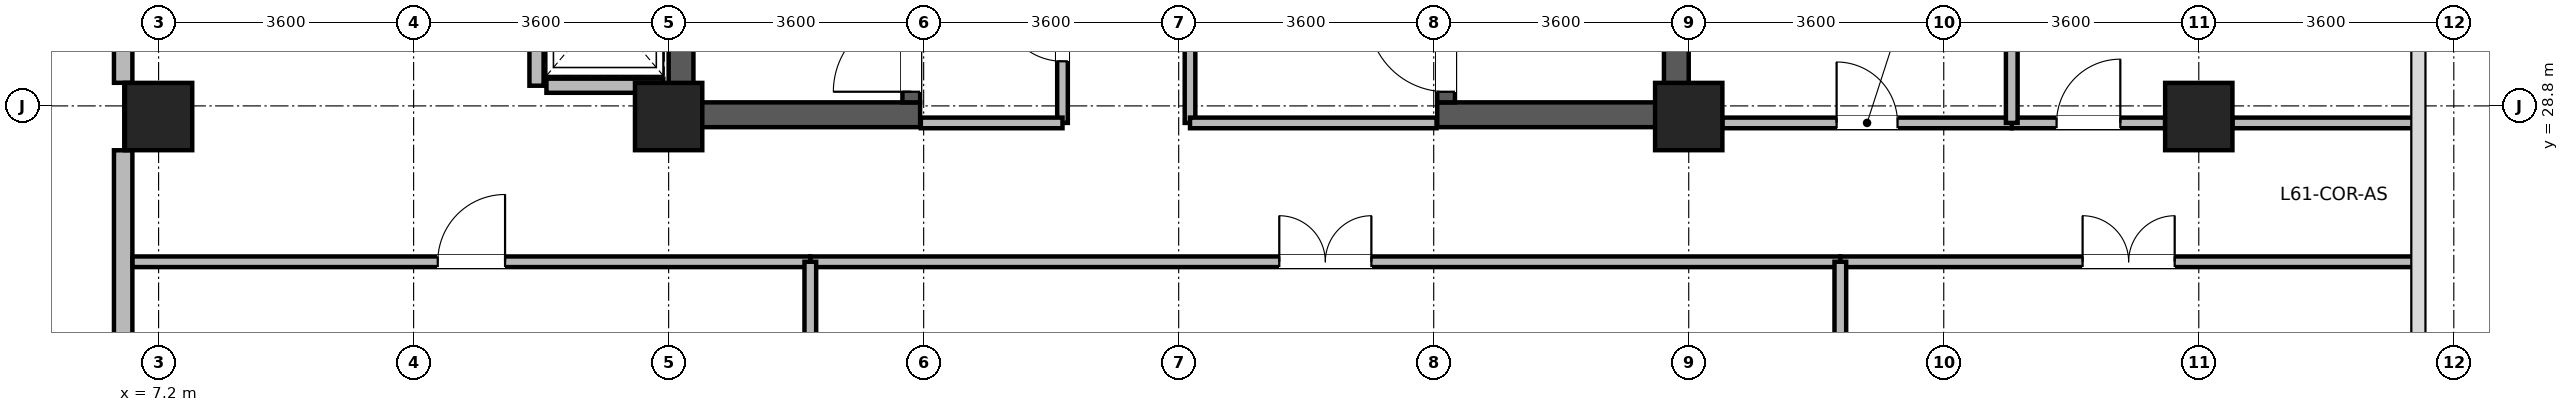
"""IFC4 building model, lengths in metres.
Left out: names, types, materials, properties, quantities, classifications, styles, units other than length and angle.
Written with IfcOpenShell. Run it as: python <this file> out.ifc"""

import sys

from ifc_helpers import new_model, si_unit, direction, frame, frame_2d, origin, origin_2d, place, context, subcontext, project, spatial, rectangle, extrude, source, transform, mapped, element, fill, save


model = new_model("IFC4")
c1 = context("Model", 3, precision=1e-05, world=origin(), true_north=direction((0.0, 1.0)))
c2 = subcontext(c1, "Body", "Model", "MODEL_VIEW")
j1 = project(units=[si_unit("LENGTHUNIT", "METRE"), si_unit("PLANEANGLEUNIT", "RADIAN")], contexts=[c1])
p1 = place(None, origin())
s1 = spatial("IfcSite", under=j1, at=p1, CompositionType="ELEMENT")
p2 = place(p1, origin())
s2 = spatial("IfcBuilding", under=s1, at=p2, CompositionType="ELEMENT")
p3 = place(p2, frame((0.0, 0.0, 238.8)))
s3 = spatial("IfcBuildingStorey", under=s2, at=p3, CompositionType="ELEMENT", Elevation=238.8)
for number, where, z_axis, x_axis in (
    (1, (14.575, 28.5, 0.0), (0.0, 0.0, 1.0), (0.0, 1.0, 0.0)),
    (2, (28.625, 28.5, 0.0), (0.0, 0.0, 1.0), (0.0, 1.0, 0.0)),
):
    element("IfcWall", number, at=place(p3, frame(where, z_axis=z_axis, x_axis=x_axis)), inside=s3, PredefinedType="SHEAR", context=c2, shape_type="SweptSolid", body=[
        extrude(rectangle(XDim=7.7, YDim=0.35, at=frame_2d((3.85, 0.0))), origin(), (0.0, 0.0, 1.0), 3.44),
    ])
for number, where, z_axis, x_axis in (
    (3, (14.75, 28.675, 0.0), (0.0, 0.0, 1.0), (1.0, 0.0, 0.0)),
    (4, (25.25, 28.675, 0.0), (0.0, 0.0, 1.0), (1.0, 0.0, 0.0)),
):
    element("IfcWall", number, at=place(p3, frame(where, z_axis=z_axis, x_axis=x_axis)), inside=s3, PredefinedType="SHEAR", context=c2, shape_type="SweptSolid", body=[
        extrude(rectangle(XDim=3.2, YDim=0.35, at=frame_2d((1.6, 0.0))), origin(), (0.0, 0.0, 1.0), 3.44),
    ])
p4 = place(p3, frame((17.825, 28.85, 0.0), z_axis=(0.0, 0.0, 1.0), x_axis=(0.0, 1.0, 0.0)))
e5 = element("IfcWall", 5, at=p4, inside=s3, PredefinedType="SHEAR", context=c2, shape_type="SweptSolid", body=[
    extrude(rectangle(XDim=7.0, YDim=0.25, at=frame_2d((3.5, 0.0))), origin(), (0.0, 0.0, 1.0), 3.44),
])
p5 = place(p4, frame((0.15, 0.0, 0.0)))
e6 = element("IfcOpeningElement", 6, at=p5, cuts=e5, PredefinedType="OPENING", context=c2, shape_type="SweptSolid", body=[
    extrude(rectangle(XDim=1.1, YDim=2.08, at=frame_2d((0.55, 1.04))), frame((0.0, 0.135, 0.0), z_axis=(0.0, -1.0, 0.0), x_axis=(1.0, 0.0, 0.0)), (0.0, 0.0, 1.0), 0.27),
])
p6 = place(p3, frame((25.375, 28.85, 0.0), z_axis=(0.0, 0.0, 1.0), x_axis=(0.0, 1.0, 0.0)))
e7 = element("IfcWall", 7, at=p6, inside=s3, PredefinedType="SHEAR", context=c2, shape_type="SweptSolid", body=[
    extrude(rectangle(XDim=7.0, YDim=0.25, at=frame_2d((3.5, 0.0))), origin(), (0.0, 0.0, 1.0), 3.44),
])
p7 = place(p6, frame((0.15, 0.0, 0.0)))
e8 = element("IfcOpeningElement", 8, at=p7, cuts=e7, PredefinedType="OPENING", context=c2, shape_type="SweptSolid", body=[
    extrude(rectangle(XDim=1.1, YDim=2.08, at=frame_2d((0.55, 1.04))), frame((0.0, 0.135, 0.0), z_axis=(0.0, -1.0, 0.0), x_axis=(1.0, 0.0, 0.0)), (0.0, 0.0, 1.0), 0.27),
])
m1 = source(origin(), c2, "Body", "SweptSolid", [
    extrude(rectangle(XDim=0.95, YDim=0.95, at=origin_2d()), origin(), (0.0, 0.0, 1.0), 3.7),
])
for number, where, z_axis, x_axis in (
    (9, (7.2, 28.65, 0.0), (0.0, 0.0, 1.0), (1.0, 0.0, 0.0)),
    (10, (14.4, 28.65, 0.0), (0.0, 0.0, 1.0), (1.0, 0.0, 0.0)),
    (11, (28.8, 28.65, 0.0), (0.0, 0.0, 1.0), (1.0, 0.0, 0.0)),
    (12, (36.0, 28.65, 0.0), (0.0, 0.0, 1.0), (1.0, 0.0, 0.0)),
):
    element("IfcColumn", number, at=place(p3, frame(where, z_axis=z_axis, x_axis=x_axis)), inside=s3, PredefinedType="COLUMN", context=c2, shape_type="MappedRepresentation", body=[
        mapped(m1, transform((0.0, 0.0, 0.0), x_axis=(1.0, 0.0, 0.0), y_axis=(0.0, 1.0, 0.0), z_axis=(0.0, 0.0, 1.0), scale=1.0)),
    ])
p8 = place(p3, frame((6.7, 29.126, 0.0), z_axis=(0.0, 0.0, 1.0), x_axis=(0.0, 1.0, 0.0)))
e13 = element("IfcWall", 13, at=p8, inside=s3, PredefinedType="STANDARD", context=c2, shape_type="SweptSolid", body=[
    extrude(rectangle(XDim=6.548, YDim=0.26, at=frame_2d((3.274, 0.0))), origin(), (0.0, 0.0, 1.0), 3.42),
])
p9 = place(p8, frame((1.037, 0.0, 0.85)))
e14 = element("IfcOpeningElement", 14, at=p9, cuts=e13, PredefinedType="OPENING", context=c2, shape_type="SweptSolid", body=[
    extrude(rectangle(XDim=1.2, YDim=1.75, at=frame_2d((0.6, 0.875))), frame((0.0, 0.14, 0.0), z_axis=(0.0, -1.0, 0.0), x_axis=(1.0, 0.0, 0.0)), (0.0, 0.0, 1.0), 0.28),
])
p10 = place(p8, frame((4.311, 0.0, 0.85)))
e15 = element("IfcOpeningElement", 15, at=p10, cuts=e13, PredefinedType="OPENING", context=c2, shape_type="SweptSolid", body=[
    extrude(rectangle(XDim=1.2, YDim=1.75, at=frame_2d((0.6, 0.875))), frame((0.0, 0.14, 0.0), z_axis=(0.0, -1.0, 0.0), x_axis=(1.0, 0.0, 0.0)), (0.0, 0.0, 1.0), 0.28),
])
p11 = place(p3, frame((6.7, 21.47, 0.0), z_axis=(0.0, 0.0, 1.0), x_axis=(0.0, 1.0, 0.0)))
e16 = element("IfcWall", 16, at=p11, inside=s3, PredefinedType="STANDARD", context=c2, shape_type="SweptSolid", body=[
    extrude(rectangle(XDim=6.704, YDim=0.26, at=frame_2d((3.352, 0.0))), origin(), (0.0, 0.0, 1.0), 3.42),
])
p12 = place(p11, frame((2.877, 0.0, 0.85)))
e17 = element("IfcOpeningElement", 17, at=p12, cuts=e16, PredefinedType="OPENING", context=c2, shape_type="SweptSolid", body=[
    extrude(rectangle(XDim=0.95, YDim=1.75, at=frame_2d((0.475, 0.875))), frame((0.0, 0.14, 0.0), z_axis=(0.0, -1.0, 0.0), x_axis=(1.0, 0.0, 0.0)), (0.0, 0.0, 1.0), 0.28),
])
p13 = place(p3, frame((12.675, 29.085, 0.0), z_axis=(0.0, 0.0, 1.0), x_axis=(1.0, 0.0, 0.0)))
e18 = element("IfcWall", 18, at=p13, inside=s3, PredefinedType="PARTITIONING", context=c2, shape_type="SweptSolid", body=[
    extrude(rectangle(XDim=1.65, YDim=0.2, at=frame_2d((0.825, 0.0))), origin(), (0.0, 0.0, 1.0), 3.42),
])
p14 = place(p3, frame((12.535, 29.085, 0.0), z_axis=(0.0, 0.0, 1.0), x_axis=(0.0, 1.0, 0.0)))
e19 = element("IfcWall", 19, at=p14, inside=s3, PredefinedType="PARTITIONING", context=c2, shape_type="SweptSolid", body=[
    extrude(rectangle(XDim=2.23, YDim=0.2, at=frame_2d((1.115, 0.0))), origin(), (0.0, 0.0, 1.0), 3.42),
])
p15 = place(p3, frame((16.4, 26.6, 0.0), z_axis=(0.0, 0.0, 1.0), x_axis=(1.0, 0.0, 0.0)))
e20 = element("IfcWall", 20, at=p15, inside=s3, PredefinedType="PARTITIONING", context=c2, shape_type="SweptSolid", body=[
    extrude(rectangle(XDim=14.54, YDim=0.15, at=frame_2d((7.27, 0.0))), origin(), (0.0, 0.0, 1.0), 3.42),
])
p16 = place(p15, frame((6.62, 0.0, 0.0)))
e21 = element("IfcOpeningElement", 21, at=p16, cuts=e20, PredefinedType="OPENING", context=c2, shape_type="SweptSolid", body=[
    extrude(rectangle(XDim=1.3, YDim=2.12, at=frame_2d((0.65, 1.06))), frame((0.0, 0.085, 0.0), z_axis=(0.0, -1.0, 0.0), x_axis=(1.0, 0.0, 0.0)), (0.0, 0.0, 1.0), 0.17),
])
p17 = place(p3, frame((6.832, 26.6, 0.0), z_axis=(0.0, 0.0, 1.0), x_axis=(1.0, 0.0, 0.0)))
e22 = element("IfcWall", 22, at=p17, inside=s3, PredefinedType="PARTITIONING", context=c2, shape_type="SweptSolid", body=[
    extrude(rectangle(XDim=9.568, YDim=0.15, at=frame_2d((4.784, 0.0))), origin(), (0.0, 0.0, 1.0), 3.42),
])
p18 = place(p17, frame((4.309, 0.0, 0.0)))
e23 = element("IfcOpeningElement", 23, at=p18, cuts=e22, PredefinedType="OPENING", context=c2, shape_type="SweptSolid", body=[
    extrude(rectangle(XDim=0.95, YDim=2.1, at=frame_2d((0.475, 1.05))), frame((0.0, 0.085, 0.0), z_axis=(0.0, -1.0, 0.0), x_axis=(1.0, 0.0, 0.0)), (0.0, 0.0, 1.0), 0.17),
])
p19 = place(p3, frame((30.94, 26.6, 0.0), z_axis=(0.0, 0.0, 1.0), x_axis=(1.0, 0.0, 0.0)))
e24 = element("IfcWall", 24, at=p19, inside=s3, PredefinedType="PARTITIONING", context=c2, shape_type="SweptSolid", body=[
    extrude(rectangle(XDim=8.14, YDim=0.15, at=frame_2d((4.07, 0.0))), origin(), (0.0, 0.0, 1.0), 3.42),
])
p20 = place(p19, frame((3.42, 0.0, 0.0)))
e25 = element("IfcOpeningElement", 25, at=p20, cuts=e24, PredefinedType="OPENING", context=c2, shape_type="SweptSolid", body=[
    extrude(rectangle(XDim=1.3, YDim=2.12, at=frame_2d((0.65, 1.06))), frame((0.0, 0.085, 0.0), z_axis=(0.0, -1.0, 0.0), x_axis=(1.0, 0.0, 0.0)), (0.0, 0.0, 1.0), 0.17),
])
p21 = place(p3, frame((33.36, 28.56, 0.0), z_axis=(0.0, 0.0, 1.0), x_axis=(1.0, 0.0, 0.0)))
e26 = element("IfcWall", 26, at=p21, inside=s3, PredefinedType="PARTITIONING", context=c2, shape_type="SweptSolid", body=[
    extrude(rectangle(XDim=2.165, YDim=0.15, at=frame_2d((1.083, 0.0))), origin(), (0.0, 0.0, 1.0), 2.87),
])
p22 = place(p21, frame((0.633, 0.0, 0.0)))
e27 = element("IfcOpeningElement", 27, at=p22, cuts=e26, PredefinedType="OPENING", context=c2, shape_type="SweptSolid", body=[
    extrude(rectangle(XDim=0.9, YDim=2.08, at=frame_2d((0.45, 1.04))), frame((0.0, 0.085, 0.0), z_axis=(0.0, -1.0, 0.0), x_axis=(1.0, 0.0, 0.0)), (0.0, 0.0, 1.0), 0.17),
])
p23 = place(p3, frame((36.475, 28.56, 0.0), z_axis=(0.0, 0.0, 1.0), x_axis=(1.0, 0.0, 0.0)))
e28 = element("IfcWall", 28, at=p23, inside=s3, PredefinedType="PARTITIONING", context=c2, shape_type="SweptSolid", body=[
    extrude(rectangle(XDim=2.605, YDim=0.15, at=frame_2d((1.302, 0.0))), origin(), (0.0, 0.0, 1.0), 3.42),
])
p24 = place(p3, frame((29.275, 28.56, 0.0), z_axis=(0.0, 0.0, 1.0), x_axis=(1.0, 0.0, 0.0)))
e29 = element("IfcWall", 29, at=p24, inside=s3, PredefinedType="PARTITIONING", context=c2, shape_type="SweptSolid", body=[
    extrude(rectangle(XDim=4.085, YDim=0.15, at=frame_2d((2.042, 0.0))), origin(), (0.0, 0.0, 1.0), 2.87),
])
p25 = place(p24, frame((1.613, 0.0, 0.0)))
e30 = element("IfcOpeningElement", 30, at=p25, cuts=e29, PredefinedType="OPENING", context=c2, shape_type="SweptSolid", body=[
    extrude(rectangle(XDim=0.86, YDim=2.02, at=frame_2d((0.43, 1.01))), frame((0.0, 0.085, 0.0), z_axis=(0.0, -1.0, 0.0), x_axis=(1.0, 0.0, 0.0)), (0.0, 0.0, 1.0), 0.17),
])
p26 = place(p3, frame((19.96, 28.56, 0.0), z_axis=(0.0, 0.0, 1.0), x_axis=(0.0, 1.0, 0.0)))
e31 = element("IfcWall", 31, at=p26, inside=s3, PredefinedType="PARTITIONING", context=c2, shape_type="SweptSolid", body=[
    extrude(rectangle(XDim=2.6, YDim=0.15, at=frame_2d((1.3, 0.0))), origin(), (0.0, 0.0, 1.0), 3.42),
])
p27 = place(p26, frame((0.87, 0.0, 0.0)))
e32 = element("IfcOpeningElement", 32, at=p27, cuts=e31, PredefinedType="OPENING", context=c2, shape_type="SweptSolid", body=[
    extrude(rectangle(XDim=0.86, YDim=2.02, at=frame_2d((0.43, 1.01))), frame((0.0, 0.085, 0.0), z_axis=(0.0, -1.0, 0.0), x_axis=(1.0, 0.0, 0.0)), (0.0, 0.0, 1.0), 0.17),
])
p28 = place(p3, frame((17.96, 28.56, 0.0), z_axis=(0.0, 0.0, 1.0), x_axis=(1.0, 0.0, 0.0)))
e33 = element("IfcWall", 33, at=p28, inside=s3, PredefinedType="PARTITIONING", context=c2, shape_type="SweptSolid", body=[
    extrude(rectangle(XDim=2.0, YDim=0.15, at=frame_2d((1.0, 0.0))), origin(), (0.0, 0.0, 1.0), 2.52),
])
for number, where, z_axis, x_axis in (
    (34, (16.4, 21.732, 0.0), (0.0, 0.0, 1.0), (0.0, 1.0, 0.0)),
    (35, (30.94, 21.732, 0.0), (0.0, 0.0, 1.0), (0.0, 1.0, 0.0)),
):
    element("IfcWall", number, at=place(p3, frame(where, z_axis=z_axis, x_axis=x_axis)), inside=s3, PredefinedType="PARTITIONING", context=c2, shape_type="SweptSolid", body=[
        extrude(rectangle(XDim=4.868, YDim=0.165, at=frame_2d((2.434, 0.0))), origin(), (0.0, 0.0, 1.0), 3.42),
    ])
p29 = place(p3, frame((21.76, 28.56, 0.0), z_axis=(0.0, 0.0, 1.0), x_axis=(0.0, 1.0, 0.0)))
e36 = element("IfcWall", 36, at=p29, inside=s3, PredefinedType="PARTITIONING", context=c2, shape_type="SweptSolid", body=[
    extrude(rectangle(XDim=4.6, YDim=0.15, at=frame_2d((2.3, 0.0))), origin(), (0.0, 0.0, 1.0), 3.42),
])
p30 = place(p29, frame((1.55, 0.0, 0.0)))
e37 = element("IfcOpeningElement", 37, at=p30, cuts=e36, PredefinedType="OPENING", context=c2, shape_type="SweptSolid", body=[
    extrude(rectangle(XDim=1.5, YDim=2.1, at=frame_2d((0.75, 1.05))), frame((0.0, 0.085, 0.0), z_axis=(0.0, -1.0, 0.0), x_axis=(1.0, 0.0, 0.0)), (0.0, 0.0, 1.0), 0.17),
])
p31 = place(p3, frame((33.36, 28.56, 0.0), z_axis=(0.0, 0.0, 1.0), x_axis=(0.0, 1.0, 0.0)))
e38 = element("IfcWall", 38, at=p31, inside=s3, PredefinedType="PARTITIONING", context=c2, shape_type="SweptSolid", body=[
    extrude(rectangle(XDim=3.84, YDim=0.165, at=frame_2d((1.92, 0.0))), origin(), (0.0, 0.0, 1.0), 3.42),
])
p32 = place(p3, frame((21.76, 28.56, 0.0), z_axis=(0.0, 0.0, 1.0), x_axis=(1.0, 0.0, 0.0)))
e39 = element("IfcWall", 39, at=p32, inside=s3, PredefinedType="PARTITIONING", context=c2, shape_type="SweptSolid", body=[
    extrude(rectangle(XDim=3.48, YDim=0.15, at=frame_2d((1.74, 0.0))), origin(), (0.0, 0.0, 1.0), 2.52),
])
p33 = place(p5, origin())
e40 = element("IfcDoor", 40, at=p33, inside=s3, OperationType="SINGLE_SWING_LEFT", PredefinedType="DOOR", context=c2, shape_type="SweptSolid", body=[
    extrude(rectangle(XDim=1.1, YDim=2.08, at=frame_2d((0.55, 1.04))), frame((0.0, 0.025, 0.0), z_axis=(0.0, -1.0, 0.0), x_axis=(1.0, 0.0, 0.0)), (0.0, 0.0, 1.0), 0.05),
])
fill(e6, e40)
p34 = place(p7, origin())
e41 = element("IfcDoor", 41, at=p34, inside=s3, OperationType="SINGLE_SWING_RIGHT", PredefinedType="DOOR", context=c2, shape_type="SweptSolid", body=[
    extrude(rectangle(XDim=1.1, YDim=2.08, at=frame_2d((0.55, 1.04))), frame((0.0, 0.025, 0.0), z_axis=(0.0, -1.0, 0.0), x_axis=(1.0, 0.0, 0.0)), (0.0, 0.0, 1.0), 0.05),
])
fill(e8, e41)
p35 = place(p16, origin())
e42 = element("IfcDoor", 42, at=p35, inside=s3, OperationType="DOUBLE_DOOR_SINGLE_SWING", PredefinedType="DOOR", context=c2, shape_type="SweptSolid", body=[
    extrude(rectangle(XDim=1.3, YDim=2.12, at=frame_2d((0.65, 1.06))), frame((0.0, 0.025, 0.0), z_axis=(0.0, -1.0, 0.0), x_axis=(1.0, 0.0, 0.0)), (0.0, 0.0, 1.0), 0.05),
])
fill(e21, e42)
p36 = place(p18, origin())
e43 = element("IfcDoor", 43, at=p36, inside=s3, OperationType="SINGLE_SWING_RIGHT", PredefinedType="DOOR", context=c2, shape_type="SweptSolid", body=[
    extrude(rectangle(XDim=0.95, YDim=2.1, at=frame_2d((0.475, 1.05))), frame((0.0, 0.025, 0.0), z_axis=(0.0, -1.0, 0.0), x_axis=(1.0, 0.0, 0.0)), (0.0, 0.0, 1.0), 0.05),
])
fill(e23, e43)
p37 = place(p20, origin())
e44 = element("IfcDoor", 44, at=p37, inside=s3, OperationType="DOUBLE_DOOR_SINGLE_SWING", PredefinedType="DOOR", context=c2, shape_type="SweptSolid", body=[
    extrude(rectangle(XDim=1.3, YDim=2.12, at=frame_2d((0.65, 1.06))), frame((0.0, 0.025, 0.0), z_axis=(0.0, -1.0, 0.0), x_axis=(1.0, 0.0, 0.0)), (0.0, 0.0, 1.0), 0.05),
])
fill(e25, e44)
p38 = place(p22, origin())
e45 = element("IfcDoor", 45, at=p38, inside=s3, OperationType="SINGLE_SWING_RIGHT", PredefinedType="DOOR", context=c2, shape_type="SweptSolid", body=[
    extrude(rectangle(XDim=0.9, YDim=2.08, at=frame_2d((0.45, 1.04))), frame((0.0, 0.025, 0.0), z_axis=(0.0, -1.0, 0.0), x_axis=(1.0, 0.0, 0.0)), (0.0, 0.0, 1.0), 0.05),
])
fill(e27, e45)
p39 = place(p25, origin())
e46 = element("IfcDoor", 46, at=p39, inside=s3, OperationType="SINGLE_SWING_LEFT", PredefinedType="DOOR", context=c2, shape_type="SweptSolid", body=[
    extrude(rectangle(XDim=0.86, YDim=2.02, at=frame_2d((0.43, 1.01))), frame((0.0, 0.025, 0.0), z_axis=(0.0, -1.0, 0.0), x_axis=(1.0, 0.0, 0.0)), (0.0, 0.0, 1.0), 0.05),
])
fill(e30, e46)
p40 = place(p27, origin())
e47 = element("IfcDoor", 47, at=p40, inside=s3, OperationType="SINGLE_SWING_RIGHT", PredefinedType="DOOR", context=c2, shape_type="SweptSolid", body=[
    extrude(rectangle(XDim=0.86, YDim=2.02, at=frame_2d((0.43, 1.01))), frame((0.0, 0.025, 0.0), z_axis=(0.0, -1.0, 0.0), x_axis=(1.0, 0.0, 0.0)), (0.0, 0.0, 1.0), 0.05),
])
fill(e32, e47)
save(model, sys.argv[1])
